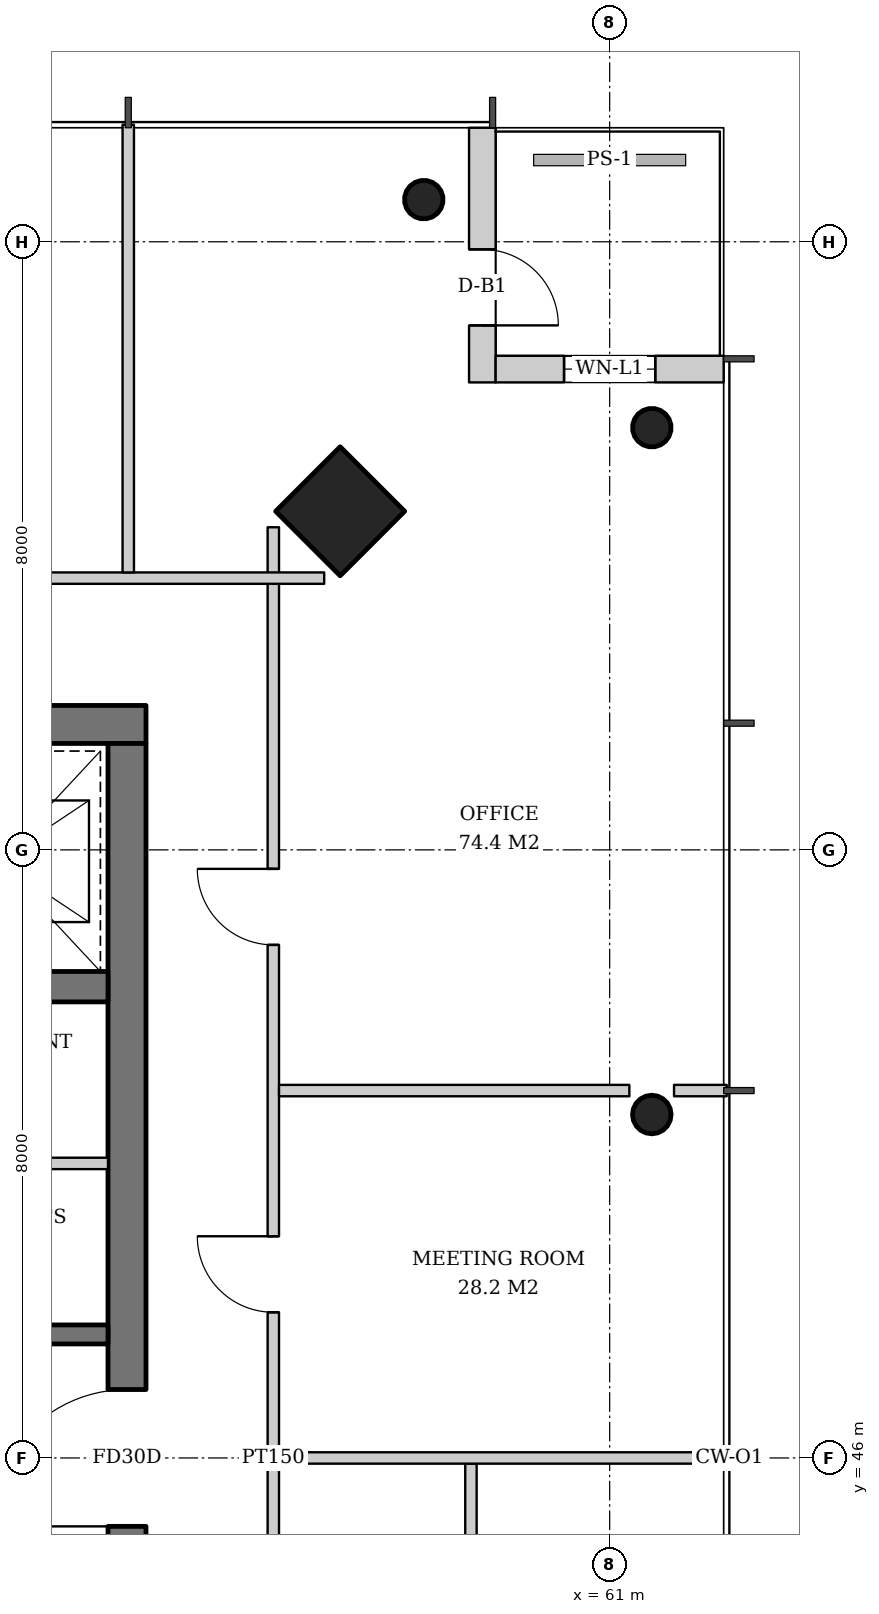
"""IFC4 building model, lengths in metres.
Left out: names, types, materials, properties, quantities, classifications, styles, units other than length and angle.
Written with IfcOpenShell. Run it as: python <this file> out.ifc"""

import sys

from ifc_helpers import new_model, si_unit, direction, frame, frame_2d, origin, origin_2d, place, context, subcontext, project, spatial, rectangle, hollow_circle, extrude, element, fill, save


model = new_model("IFC4")
c1 = context("Model", 3, precision=1e-05, world=origin(), true_north=direction((0.0, 1.0)))
c2 = subcontext(c1, "Body", "Model", "MODEL_VIEW")
j1 = project(units=[si_unit("LENGTHUNIT", "METRE"), si_unit("PLANEANGLEUNIT", "RADIAN")], contexts=[c1])
p1 = place(None, origin())
s1 = spatial("IfcSite", under=j1, at=p1, CompositionType="ELEMENT")
p2 = place(p1, origin())
s2 = spatial("IfcBuilding", under=s1, at=p2, CompositionType="ELEMENT")
p3 = place(p2, frame((0.0, 0.0, 252.8)))
s3 = spatial("IfcBuildingStorey", under=s2, at=p3, CompositionType="ELEMENT", Elevation=252.8)
p4 = place(p3, frame((57.493, 58.493, 0.0), z_axis=(-0.031962158256, -0.031962158256, 0.998977898093), x_axis=(0.707106781187, -0.707106781187, 0.0)))
e1 = element("IfcColumn", 1, at=p4, inside=s3, PredefinedType="COLUMN", context=c2, shape_type="SweptSolid", body=[
    extrude(rectangle(XDim=1.2, YDim=1.2, at=origin_2d()), origin(), (0.0, 0.0, 1.0), 3.804),
])
p5 = place(p3, frame((61.593, 59.593, 0.0), z_axis=(-0.031898107953, -0.031898107953, 0.998981992539), x_axis=(0.707106781187, -0.707106781187, 0.0)))
e2 = element("IfcColumn", 2, at=p5, inside=s3, PredefinedType="COLUMN", context=c2, shape_type="SweptSolid", body=[
    extrude(hollow_circle(Radius=0.254, WallThickness=0.02, at=origin_2d()), origin(), (0.0, 0.0, 1.0), 3.804),
])
p6 = place(p3, frame((61.593, 50.531, 0.0), z_axis=(-0.031912535354, -0.010658915229, 0.999433828532), x_axis=(0.316800238982, -0.948492281772, 0.0)))
e3 = element("IfcColumn", 3, at=p6, inside=s3, PredefinedType="COLUMN", context=c2, shape_type="SweptSolid", body=[
    extrude(hollow_circle(Radius=0.254, WallThickness=0.02, at=origin_2d()), origin(), (0.0, 0.0, 1.0), 3.802),
])
p7 = place(p3, frame((58.593, 62.593, 0.0), z_axis=(-0.031898107953, -0.031898107953, 0.998981992539), x_axis=(0.707106781187, -0.707106781187, 0.0)))
e4 = element("IfcColumn", 4, at=p7, inside=s3, PredefinedType="COLUMN", context=c2, shape_type="SweptSolid", body=[
    extrude(hollow_circle(Radius=0.254, WallThickness=0.02, at=origin_2d()), origin(), (0.0, 0.0, 1.0), 3.804),
])
p8 = place(p3, frame((35.1, 55.65, 0.0), z_axis=(0.0, 0.0, 1.0), x_axis=(1.0, 0.0, 0.0)))
e5 = element("IfcWall", 5, at=p8, inside=s3, PredefinedType="SHEAR", context=c2, shape_type="SweptSolid", body=[
    extrude(rectangle(XDim=19.8, YDim=0.5, at=frame_2d((9.9, 0.0))), origin(), (0.0, 0.0, 1.0), 3.8),
])
p9 = place(p8, frame((14.54, 0.0, 0.0)))
e6 = element("IfcOpeningElement", 6, at=p9, cuts=e5, PredefinedType="OPENING", context=c2, shape_type="SweptSolid", body=[
    extrude(rectangle(XDim=1.0, YDim=2.1, at=frame_2d((0.5, 1.05))), frame((0.0, 0.26, 0.0), z_axis=(0.0, -1.0, 0.0), x_axis=(1.0, 0.0, 0.0)), (0.0, 0.0, 1.0), 0.52),
])
p10 = place(p8, frame((1.75, 0.0, 0.0)))
e7 = element("IfcOpeningElement", 7, at=p10, cuts=e5, PredefinedType="OPENING", context=c2, shape_type="SweptSolid", body=[
    extrude(rectangle(XDim=1.0, YDim=2.1, at=frame_2d((0.5, 1.05))), frame((0.0, 0.26, 0.0), z_axis=(0.0, -1.0, 0.0), x_axis=(1.0, 0.0, 0.0)), (0.0, 0.0, 1.0), 0.52),
])
p11 = place(p8, frame((3.895, 0.0, 0.0)))
e8 = element("IfcOpeningElement", 8, at=p11, cuts=e5, PredefinedType="OPENING", context=c2, shape_type="SweptSolid", body=[
    extrude(rectangle(XDim=1.0, YDim=2.1, at=frame_2d((0.5, 1.05))), frame((0.0, 0.26, 0.0), z_axis=(0.0, -1.0, 0.0), x_axis=(1.0, 0.0, 0.0)), (0.0, 0.0, 1.0), 0.52),
])
p12 = place(p3, frame((54.65, 36.6, 0.0), z_axis=(0.0, 0.0, 1.0), x_axis=(0.0, 1.0, 0.0)))
e9 = element("IfcWall", 9, at=p12, inside=s3, PredefinedType="SHEAR", context=c2, shape_type="SweptSolid", body=[
    extrude(rectangle(XDim=18.8, YDim=0.5, at=frame_2d((9.4, 0.0))), origin(), (0.0, 0.0, 1.0), 3.8),
])
p13 = place(p12, frame((8.5, 0.0, 0.0)))
e10 = element("IfcOpeningElement", 10, at=p13, cuts=e9, PredefinedType="OPENING", context=c2, shape_type="SweptSolid", body=[
    extrude(rectangle(XDim=1.8, YDim=2.4, at=frame_2d((0.9, 1.2))), frame((0.0, 0.26, 0.0), z_axis=(0.0, -1.0, 0.0), x_axis=(1.0, 0.0, 0.0)), (0.0, 0.0, 1.0), 0.52),
])
p14 = place(p3, frame((35.6, 52.2, 0.0), z_axis=(0.0, 0.0, 1.0), x_axis=(1.0, 0.0, 0.0)))
e11 = element("IfcWall", 11, at=p14, inside=s3, PredefinedType="SHEAR", context=c2, shape_type="SweptSolid", body=[
    extrude(rectangle(XDim=18.8, YDim=0.4, at=frame_2d((9.4, 0.0))), origin(), (0.0, 0.0, 1.0), 3.8),
])
p15 = place(p3, frame((59.325, 63.5, 0.0), z_axis=(0.0, 0.0, 1.0), x_axis=(0.0, -1.0, 0.0)))
e12 = element("IfcWall", 12, at=p15, inside=s3, PredefinedType="SOLIDWALL", context=c2, shape_type="SweptSolid", body=[
    extrude(rectangle(XDim=3.35, YDim=0.35, at=frame_2d((1.675, 0.0))), origin(), (0.0, 0.0, 1.0), 3.62),
])
p16 = place(p15, frame((1.6, 0.0, 0.0)))
e13 = element("IfcOpeningElement", 13, at=p16, cuts=e12, PredefinedType="OPENING", context=c2, shape_type="SweptSolid", body=[
    extrude(rectangle(XDim=1.0, YDim=2.4, at=frame_2d((0.5, 1.2))), frame((0.0, 0.185, 0.0), z_axis=(0.0, -1.0, 0.0), x_axis=(1.0, 0.0, 0.0)), (0.0, 0.0, 1.0), 0.37),
])
p17 = place(p3, frame((59.5, 60.325, 0.0), z_axis=(0.0, 0.0, 1.0), x_axis=(1.0, 0.0, 0.0)))
e14 = element("IfcWall", 14, at=p17, inside=s3, PredefinedType="SOLIDWALL", context=c2, shape_type="SweptSolid", body=[
    extrude(rectangle(XDim=3.0, YDim=0.35, at=frame_2d((1.5, 0.0))), origin(), (0.0, 0.0, 1.0), 3.62),
])
p18 = place(p17, frame((0.9, 0.0, 0.6)))
e15 = element("IfcOpeningElement", 15, at=p18, cuts=e14, PredefinedType="OPENING", context=c2, shape_type="SweptSolid", body=[
    extrude(rectangle(XDim=1.2, YDim=2.55, at=frame_2d((0.6, 1.275))), frame((0.0, 0.185, 0.0), z_axis=(0.0, -1.0, 0.0), x_axis=(1.0, 0.0, 0.0)), (0.0, 0.0, 1.0), 0.37),
])
p19 = place(p3, frame((48.93, 47.625, 0.0), z_axis=(0.0, 0.0, 1.0), x_axis=(1.0, 0.0, 0.0)))
e16 = element("IfcWall", 16, at=p19, inside=s3, PredefinedType="SHEAR", context=c2, shape_type="SweptSolid", body=[
    extrude(rectangle(XDim=5.47, YDim=0.25, at=frame_2d((2.735, 0.0))), origin(), (0.0, 0.0, 1.0), 3.8),
])
p20 = place(p19, frame((0.78, 0.0, 0.0)))
e17 = element("IfcOpeningElement", 17, at=p20, cuts=e16, PredefinedType="OPENING", context=c2, shape_type="SweptSolid", body=[
    extrude(rectangle(XDim=1.0, YDim=2.1, at=frame_2d((0.5, 1.05))), frame((0.0, 0.135, 0.0), z_axis=(0.0, -1.0, 0.0), x_axis=(1.0, 0.0, 0.0)), (0.0, 0.0, 1.0), 0.27),
])
p21 = place(p19, frame((3.64, 0.0, 0.0)))
e18 = element("IfcOpeningElement", 18, at=p21, cuts=e16, PredefinedType="OPENING", context=c2, shape_type="SweptSolid", body=[
    extrude(rectangle(XDim=1.0, YDim=2.1, at=frame_2d((0.5, 1.05))), frame((0.0, 0.135, 0.0), z_axis=(0.0, -1.0, 0.0), x_axis=(1.0, 0.0, 0.0)), (0.0, 0.0, 1.0), 0.27),
])
p22 = place(p3, frame((51.74, 49.875, 0.0), z_axis=(0.0, 0.0, 1.0), x_axis=(1.0, 0.0, 0.0)))
e19 = element("IfcWall", 19, at=p22, inside=s3, PredefinedType="SOLIDWALL", context=c2, shape_type="SweptSolid", body=[
    extrude(rectangle(XDim=2.66, YDim=0.15, at=frame_2d((1.33, 0.0))), origin(), (0.0, 0.0, 1.0), 3.62),
])
p23 = place(p22, frame((0.83, 0.0, 0.0)))
e20 = element("IfcOpeningElement", 20, at=p23, cuts=e19, PredefinedType="OPENING", context=c2, shape_type="SweptSolid", body=[
    extrude(rectangle(XDim=1.0, YDim=2.1, at=frame_2d((0.5, 1.05))), frame((0.0, 0.085, 0.0), z_axis=(0.0, -1.0, 0.0), x_axis=(1.0, 0.0, 0.0)), (0.0, 0.0, 1.0), 0.17),
])
p24 = place(p3, frame((59.175, 41.242, 0.0), z_axis=(0.0, 0.0, 1.0), x_axis=(0.0, 1.0, 0.0)))
e21 = element("IfcWall", 21, at=p24, inside=s3, PredefinedType="PARTITIONING", context=c2, shape_type="SweptSolid", body=[
    extrude(rectangle(XDim=4.683, YDim=0.15, at=frame_2d((2.342, 0.0))), origin(), (0.0, 0.0, 1.0), 3.12),
])
p25 = place(p3, frame((56.575, 33.756, 0.0), z_axis=(0.0, 0.0, 1.0), x_axis=(0.0, 1.0, 0.0)))
e22 = element("IfcWall", 22, at=p25, inside=s3, PredefinedType="PARTITIONING", context=c2, shape_type="SweptSolid", body=[
    extrude(rectangle(XDim=24.489, YDim=0.15, at=frame_2d((12.244, 0.0))), origin(), (0.0, 0.0, 1.0), 3.02),
])
p26 = place(p25, frame((4.494, 0.0, 0.0)))
e23 = element("IfcOpeningElement", 23, at=p26, cuts=e22, PredefinedType="OPENING", context=c2, shape_type="SweptSolid", body=[
    extrude(rectangle(XDim=1.0, YDim=2.1, at=frame_2d((0.5, 1.05))), frame((0.0, 0.085, 0.0), z_axis=(0.0, -1.0, 0.0), x_axis=(1.0, 0.0, 0.0)), (0.0, 0.0, 1.0), 0.17),
])
p27 = place(p25, frame((9.328, 0.0, 0.0)))
e24 = element("IfcOpeningElement", 24, at=p27, cuts=e22, PredefinedType="OPENING", context=c2, shape_type="SweptSolid", body=[
    extrude(rectangle(XDim=1.0, YDim=2.1, at=frame_2d((0.5, 1.05))), frame((0.0, 0.085, 0.0), z_axis=(0.0, -1.0, 0.0), x_axis=(1.0, 0.0, 0.0)), (0.0, 0.0, 1.0), 0.17),
])
p28 = place(p25, frame((14.161, 0.0, 0.0)))
e25 = element("IfcOpeningElement", 25, at=p28, cuts=e22, PredefinedType="OPENING", context=c2, shape_type="SweptSolid", body=[
    extrude(rectangle(XDim=1.0, YDim=2.1, at=frame_2d((0.5, 1.05))), frame((0.0, 0.085, 0.0), z_axis=(0.0, -1.0, 0.0), x_axis=(1.0, 0.0, 0.0)), (0.0, 0.0, 1.0), 0.17),
])
p29 = place(p25, frame((18.994, 0.0, 0.0)))
e26 = element("IfcOpeningElement", 26, at=p29, cuts=e22, PredefinedType="OPENING", context=c2, shape_type="SweptSolid", body=[
    extrude(rectangle(XDim=1.0, YDim=2.1, at=frame_2d((0.5, 1.05))), frame((0.0, 0.085, 0.0), z_axis=(0.0, -1.0, 0.0), x_axis=(1.0, 0.0, 0.0)), (0.0, 0.0, 1.0), 0.17),
])
p30 = place(p3, frame((56.65, 46.0, 0.0), z_axis=(0.0, 0.0, 1.0), x_axis=(1.0, 0.0, 0.0)))
e27 = element("IfcWall", 27, at=p30, inside=s3, PredefinedType="PARTITIONING", context=c2, shape_type="SweptSolid", body=[
    extrude(rectangle(XDim=5.89, YDim=0.15, at=frame_2d((2.945, 0.0))), origin(), (0.0, 0.0, 1.0), 3.12),
])
p31 = place(p3, frame((56.65, 50.833, 0.0), z_axis=(0.0, 0.0, 1.0), x_axis=(1.0, 0.0, 0.0)))
e28 = element("IfcWall", 28, at=p31, inside=s3, PredefinedType="PARTITIONING", context=c2, shape_type="SweptSolid", body=[
    extrude(rectangle(XDim=4.609, YDim=0.15, at=frame_2d((2.305, 0.0))), origin(), (0.0, 0.0, 1.0), 3.62),
])
p32 = place(p3, frame((61.847, 50.833, 0.0), z_axis=(0.0, 0.0, 1.0), x_axis=(1.0, 0.0, 0.0)))
e29 = element("IfcWall", 29, at=p32, inside=s3, PredefinedType="PARTITIONING", context=c2, shape_type="SweptSolid", body=[
    extrude(rectangle(XDim=0.693, YDim=0.15, at=frame_2d((0.347, 0.0))), origin(), (0.0, 0.0, 1.0), 3.62),
])
p33 = place(p3, frame((57.244, 57.575, 0.0), z_axis=(0.0, 0.0, 1.0), x_axis=(-1.0, 0.0, 0.0)))
e30 = element("IfcWall", 30, at=p33, inside=s3, PredefinedType="PARTITIONING", context=c2, shape_type="SweptSolid", body=[
    extrude(rectangle(XDim=24.489, YDim=0.15, at=frame_2d((12.244, 0.0))), origin(), (0.0, 0.0, 1.0), 3.02),
])
p34 = place(p33, frame((4.494, 0.0, 0.0)))
e31 = element("IfcOpeningElement", 31, at=p34, cuts=e30, PredefinedType="OPENING", context=c2, shape_type="SweptSolid", body=[
    extrude(rectangle(XDim=1.0, YDim=2.1, at=frame_2d((0.5, 1.05))), frame((0.0, 0.085, 0.0), z_axis=(0.0, -1.0, 0.0), x_axis=(1.0, 0.0, 0.0)), (0.0, 0.0, 1.0), 0.17),
])
p35 = place(p33, frame((8.928, 0.0, 0.0)))
e32 = element("IfcOpeningElement", 32, at=p35, cuts=e30, PredefinedType="OPENING", context=c2, shape_type="SweptSolid", body=[
    extrude(rectangle(XDim=1.8, YDim=2.4, at=frame_2d((0.9, 1.2))), frame((0.0, 0.085, 0.0), z_axis=(0.0, -1.0, 0.0), x_axis=(1.0, 0.0, 0.0)), (0.0, 0.0, 1.0), 0.17),
])
p36 = place(p33, frame((18.994, 0.0, 0.0)))
e33 = element("IfcOpeningElement", 33, at=p36, cuts=e30, PredefinedType="OPENING", context=c2, shape_type="SweptSolid", body=[
    extrude(rectangle(XDim=1.0, YDim=2.1, at=frame_2d((0.5, 1.05))), frame((0.0, 0.085, 0.0), z_axis=(0.0, -1.0, 0.0), x_axis=(1.0, 0.0, 0.0)), (0.0, 0.0, 1.0), 0.17),
])
p37 = place(p3, frame((54.667, 57.65, 0.0), z_axis=(0.0, 0.0, 1.0), x_axis=(0.0, 1.0, 0.0)))
e34 = element("IfcWall", 34, at=p37, inside=s3, PredefinedType="PARTITIONING", context=c2, shape_type="SweptSolid", body=[
    extrude(rectangle(XDim=5.89, YDim=0.15, at=frame_2d((2.945, 0.0))), origin(), (0.0, 0.0, 1.0), 3.02),
])
p38 = place(p16, origin())
e35 = element("IfcDoor", 35, at=p38, inside=s3, OperationType="SINGLE_SWING_RIGHT", PredefinedType="DOOR", context=c2, shape_type="SweptSolid", body=[
    extrude(rectangle(XDim=1.0, YDim=2.4, at=frame_2d((0.5, 1.2))), frame((0.0, 0.025, 0.0), z_axis=(0.0, -1.0, 0.0), x_axis=(1.0, 0.0, 0.0)), (0.0, 0.0, 1.0), 0.05),
])
fill(e13, e35)
p39 = place(p18, origin())
e36 = element("IfcWindow", 36, at=p39, inside=s3, PartitioningType="SINGLE_PANEL", PredefinedType="WINDOW", context=c2, shape_type="SweptSolid", body=[
    extrude(rectangle(XDim=1.2, YDim=2.55, at=frame_2d((0.6, 1.275))), frame((0.0, 0.03, 0.0), z_axis=(0.0, -1.0, 0.0), x_axis=(1.0, 0.0, 0.0)), (0.0, 0.0, 1.0), 0.06),
])
fill(e15, e36)
p40 = place(p13, origin())
e37 = element("IfcDoor", 37, at=p40, inside=s3, OperationType="DOUBLE_DOOR_SINGLE_SWING", PredefinedType="DOOR", context=c2, shape_type="SweptSolid", body=[
    extrude(rectangle(XDim=1.8, YDim=2.4, at=frame_2d((0.9, 1.2))), frame((0.0, 0.025, 0.0), z_axis=(0.0, -1.0, 0.0), x_axis=(1.0, 0.0, 0.0)), (0.0, 0.0, 1.0), 0.05),
])
fill(e10, e37)
p41 = place(p28, origin())
e38 = element("IfcDoor", 38, at=p41, inside=s3, OperationType="SINGLE_SWING_RIGHT", PredefinedType="DOOR", context=c2, shape_type="SweptSolid", body=[
    extrude(rectangle(XDim=1.0, YDim=2.1, at=frame_2d((0.5, 1.05))), frame((0.0, 0.025, 0.0), z_axis=(0.0, -1.0, 0.0), x_axis=(1.0, 0.0, 0.0)), (0.0, 0.0, 1.0), 0.05),
])
fill(e25, e38)
p42 = place(p29, origin())
e39 = element("IfcDoor", 39, at=p42, inside=s3, OperationType="SINGLE_SWING_RIGHT", PredefinedType="DOOR", context=c2, shape_type="SweptSolid", body=[
    extrude(rectangle(XDim=1.0, YDim=2.1, at=frame_2d((0.5, 1.05))), frame((0.0, 0.025, 0.0), z_axis=(0.0, -1.0, 0.0), x_axis=(1.0, 0.0, 0.0)), (0.0, 0.0, 1.0), 0.05),
])
fill(e26, e39)
save(model, sys.argv[1])
